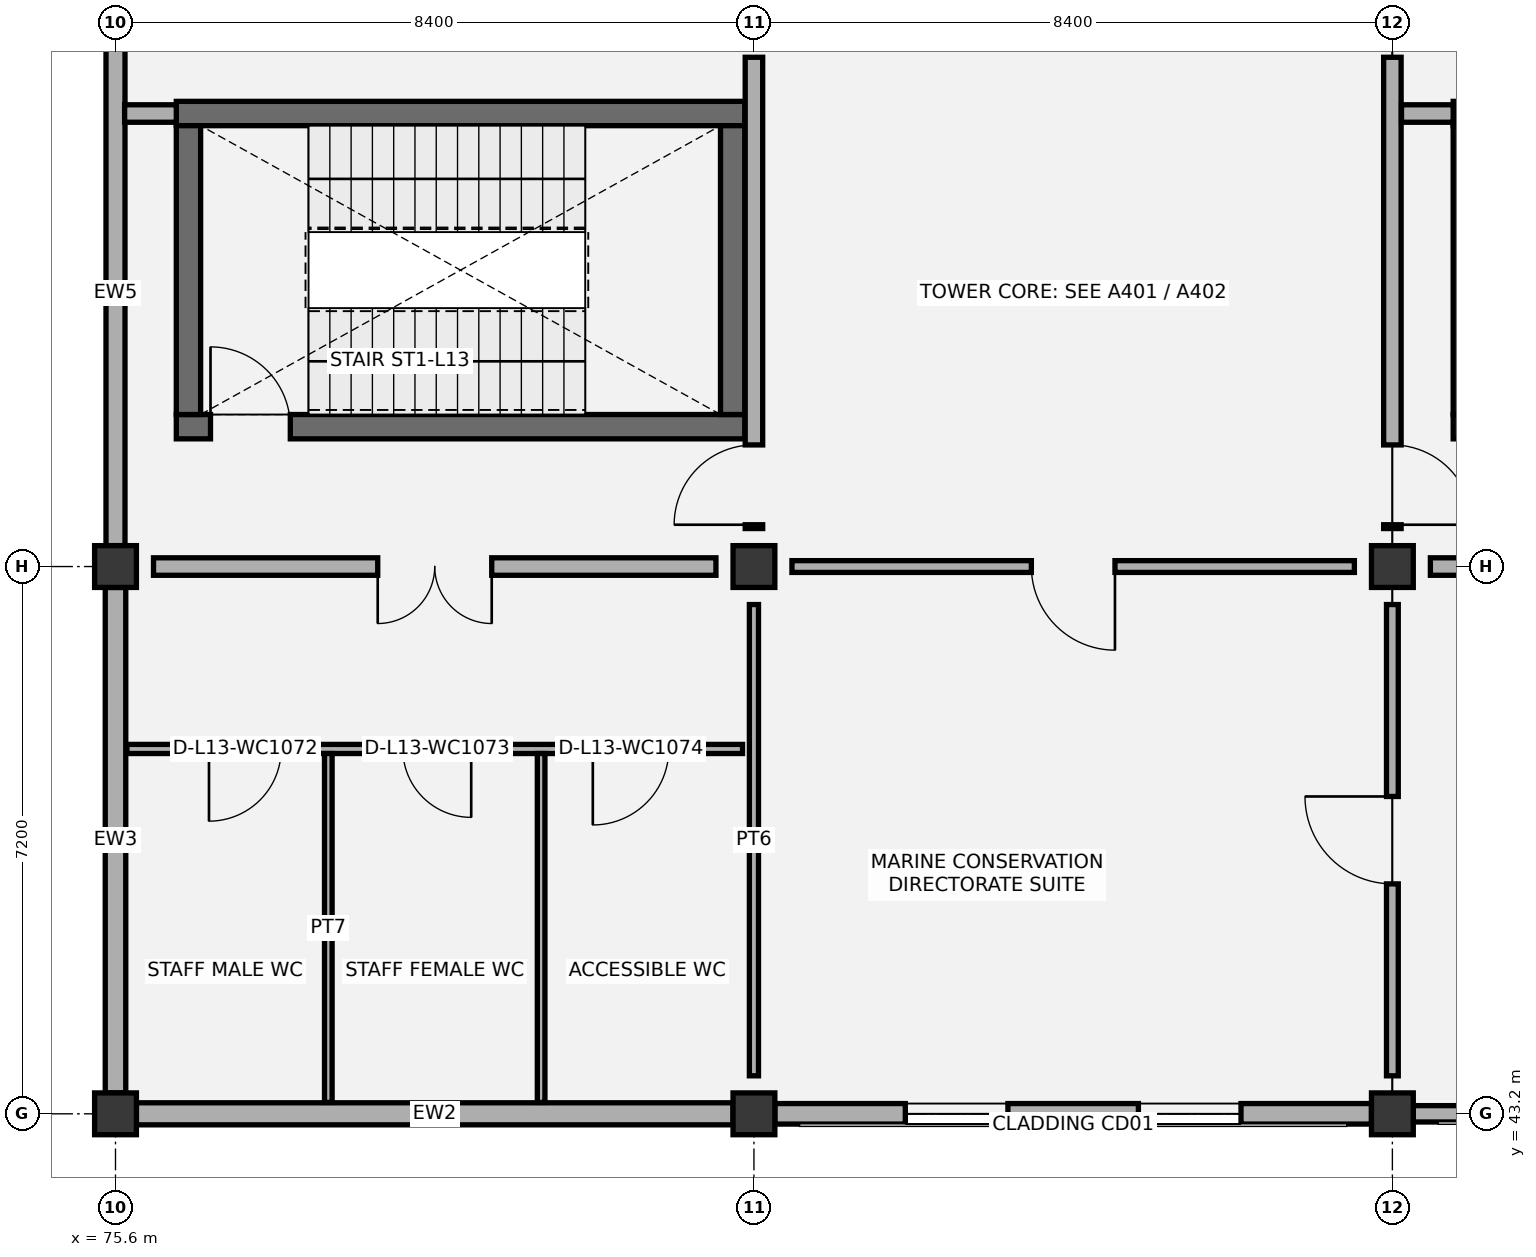
"""IFC4 building model, lengths in metres.
Left out: names, types, materials, properties, quantities, classifications, styles, units other than length and angle.
Written with IfcOpenShell. Run it as: python <this file> out.ifc"""

import sys

from ifc_helpers import new_model, si_unit, direction, frame, frame_2d, origin, origin_2d, place, context, subcontext, project, spatial, rectangle, extrude, element, fill, save


model = new_model("IFC4")
c1 = context("Model", 3, precision=1e-05, world=origin(), true_north=direction((0.0, 1.0)))
c2 = subcontext(c1, "Body", "Model", "MODEL_VIEW")
j1 = project(units=[si_unit("LENGTHUNIT", "METRE"), si_unit("PLANEANGLEUNIT", "RADIAN")], contexts=[c1])
p1 = place(None, origin())
s1 = spatial("IfcSite", under=j1, at=p1, CompositionType="ELEMENT")
p2 = place(p1, origin())
s2 = spatial("IfcBuilding", under=s1, at=p2, CompositionType="ELEMENT")
p3 = place(p2, frame((0.0, 0.0, 60.6)))
s3 = spatial("IfcBuildingStorey", under=s2, at=p3, CompositionType="ELEMENT", Elevation=60.6)
for number, where, z_axis, x_axis in (
    (1, (75.6, 43.2, 0.0), (0.0, 0.0, 1.0), (1.0, 0.0, 0.0)),
    (2, (75.6, 50.4, 0.0), (0.0, 0.0, 1.0), (1.0, 0.0, 0.0)),
    (3, (84.0, 43.2, 0.0), (0.0, 0.0, 1.0), (1.0, 0.0, 0.0)),
    (4, (84.0, 50.4, 0.0), (0.0, 0.0, 1.0), (1.0, 0.0, 0.0)),
    (5, (92.4, 43.2, 0.0), (0.0, 0.0, 1.0), (1.0, 0.0, 0.0)),
    (6, (92.4, 50.4, 0.0), (0.0, 0.0, 1.0), (1.0, 0.0, 0.0)),
):
    element("IfcColumn", number, at=place(p3, frame(where, z_axis=z_axis, x_axis=x_axis)), inside=s3, PredefinedType="COLUMN", context=c2, shape_type="SweptSolid", body=[
        extrude(rectangle(XDim=0.55, YDim=0.55, at=origin_2d()), origin(), (0.0, 0.0, 1.0), 4.2),
    ])
p4 = place(p3, frame((76.4, 52.24, 0.0), z_axis=(0.0, 0.0, 1.0), x_axis=(1.0, 0.0, 0.0)))
e7 = element("IfcWall", 7, at=p4, inside=s3, PredefinedType="SHEAR", context=c2, shape_type="SweptSolid", body=[
    extrude(rectangle(XDim=7.48, YDim=0.32, at=frame_2d((3.74, 0.0))), origin(), (0.0, 0.0, 1.0), 3.95),
])
p5 = place(p4, frame((0.45, 0.0, 0.0)))
e8 = element("IfcOpeningElement", 8, at=p5, cuts=e7, PredefinedType="OPENING", context=c2, shape_type="SweptSolid", body=[
    extrude(rectangle(XDim=1.05, YDim=2.15, at=frame_2d((0.525, 1.075))), frame((0.0, 0.17, 0.0), z_axis=(0.0, -1.0, 0.0), x_axis=(1.0, 0.0, 0.0)), (0.0, 0.0, 1.0), 0.34),
])
p6 = place(p3, frame((76.4, 56.36, 0.0), z_axis=(0.0, 0.0, 1.0), x_axis=(1.0, 0.0, 0.0)))
e9 = element("IfcWall", 9, at=p6, inside=s3, PredefinedType="SHEAR", context=c2, shape_type="SweptSolid", body=[
    extrude(rectangle(XDim=7.48, YDim=0.32, at=frame_2d((3.74, 0.0))), origin(), (0.0, 0.0, 1.0), 3.95),
])
for number, where, z_axis, x_axis in (
    (10, (76.56, 52.4, 0.0), (0.0, 0.0, 1.0), (0.0, 1.0, 0.0)),
    (11, (83.72, 52.4, 0.0), (0.0, 0.0, 1.0), (0.0, 1.0, 0.0)),
):
    element("IfcWall", number, at=place(p3, frame(where, z_axis=z_axis, x_axis=x_axis)), inside=s3, PredefinedType="SHEAR", context=c2, shape_type="SweptSolid", body=[
        extrude(rectangle(XDim=3.8, YDim=0.32, at=frame_2d((1.9, 0.0))), origin(), (0.0, 0.0, 1.0), 3.95),
    ])
p7 = place(p3, frame((93.2, 52.24, 0.0), z_axis=(0.0, 0.0, 1.0), x_axis=(1.0, 0.0, 0.0)))
e12 = element("IfcWall", 12, at=p7, inside=s3, PredefinedType="SHEAR", context=c2, shape_type="SweptSolid", body=[
    extrude(rectangle(XDim=7.48, YDim=0.32, at=frame_2d((3.74, 0.0))), origin(), (0.0, 0.0, 1.0), 3.95),
])
p8 = place(p7, frame((0.45, 0.0, 0.0)))
e13 = element("IfcOpeningElement", 13, at=p8, cuts=e12, PredefinedType="OPENING", context=c2, shape_type="SweptSolid", body=[
    extrude(rectangle(XDim=1.05, YDim=2.15, at=frame_2d((0.525, 1.075))), frame((0.0, 0.17, 0.0), z_axis=(0.0, -1.0, 0.0), x_axis=(1.0, 0.0, 0.0)), (0.0, 0.0, 1.0), 0.34),
])
p9 = place(p3, frame((93.2, 56.36, 0.0), z_axis=(0.0, 0.0, 1.0), x_axis=(1.0, 0.0, 0.0)))
e14 = element("IfcWall", 14, at=p9, inside=s3, PredefinedType="SHEAR", context=c2, shape_type="SweptSolid", body=[
    extrude(rectangle(XDim=7.48, YDim=0.32, at=frame_2d((3.74, 0.0))), origin(), (0.0, 0.0, 1.0), 3.95),
])
p10 = place(p3, frame((93.36, 52.4, 0.0), z_axis=(0.0, 0.0, 1.0), x_axis=(0.0, 1.0, 0.0)))
e15 = element("IfcWall", 15, at=p10, inside=s3, PredefinedType="SHEAR", context=c2, shape_type="SweptSolid", body=[
    extrude(rectangle(XDim=3.8, YDim=0.32, at=frame_2d((1.9, 0.0))), origin(), (0.0, 0.0, 1.0), 3.95),
])
p11 = place(p3, frame((75.875, 43.2, 0.0), z_axis=(0.0, 0.0, 1.0), x_axis=(1.0, 0.0, 0.0)))
e16 = element("IfcWall", 16, at=p11, inside=s3, PredefinedType="SOLIDWALL", context=c2, shape_type="SweptSolid", body=[
    extrude(rectangle(XDim=7.85, YDim=0.29, at=frame_2d((3.925, 0.0))), origin(), (0.0, 0.0, 1.0), 3.395),
])
p12 = place(p3, frame((75.6, 43.475, 0.0), z_axis=(0.0, 0.0, 1.0), x_axis=(0.0, 1.0, 0.0)))
e17 = element("IfcWall", 17, at=p12, inside=s3, PredefinedType="SOLIDWALL", context=c2, shape_type="SweptSolid", body=[
    extrude(rectangle(XDim=6.65, YDim=0.27, at=frame_2d((3.325, 0.0))), origin(), (0.0, 0.0, 1.0), 3.395),
])
p13 = place(p3, frame((75.6, 50.675, 0.0), z_axis=(0.0, 0.0, 1.0), x_axis=(0.0, 1.0, 0.0)))
e18 = element("IfcWall", 18, at=p13, inside=s3, PredefinedType="SOLIDWALL", context=c2, shape_type="SweptSolid", body=[
    extrude(rectangle(XDim=6.65, YDim=0.25, at=frame_2d((3.325, 0.0))), origin(), (0.0, 0.0, 1.0), 3.395),
])
p14 = place(p3, frame((84.275, 43.2, 0.0), z_axis=(0.0, 0.0, 1.0), x_axis=(1.0, 0.0, 0.0)))
e19 = element("IfcWall", 19, at=p14, inside=s3, PredefinedType="SOLIDWALL", context=c2, shape_type="SweptSolid", body=[
    extrude(rectangle(XDim=7.85, YDim=0.27, at=frame_2d((3.925, 0.0))), origin(), (0.0, 0.0, 1.0), 3.395),
])
p15 = place(p14, frame((1.717, 0.0, 0.95)))
e20 = element("IfcOpeningElement", 20, at=p15, cuts=e19, PredefinedType="OPENING", context=c2, shape_type="SweptSolid", body=[
    extrude(rectangle(XDim=1.35, YDim=1.65, at=frame_2d((0.675, 0.825))), frame((0.0, 0.145, 0.0), z_axis=(0.0, -1.0, 0.0), x_axis=(1.0, 0.0, 0.0)), (0.0, 0.0, 1.0), 0.29),
])
p16 = place(p14, frame((4.783, 0.0, 0.95)))
e21 = element("IfcOpeningElement", 21, at=p16, cuts=e19, PredefinedType="OPENING", context=c2, shape_type="SweptSolid", body=[
    extrude(rectangle(XDim=1.35, YDim=1.65, at=frame_2d((0.675, 0.825))), frame((0.0, 0.145, 0.0), z_axis=(0.0, -1.0, 0.0), x_axis=(1.0, 0.0, 0.0)), (0.0, 0.0, 1.0), 0.29),
])
p17 = place(p3, frame((92.675, 43.2, 0.0), z_axis=(0.0, 0.0, 1.0), x_axis=(1.0, 0.0, 0.0)))
e22 = element("IfcWall", 22, at=p17, inside=s3, PredefinedType="SOLIDWALL", context=c2, shape_type="SweptSolid", body=[
    extrude(rectangle(XDim=7.85, YDim=0.215, at=frame_2d((3.925, 0.0))), origin(), (0.0, 0.0, 1.0), 3.395),
])
p18 = place(p17, frame((1.417, 0.0, 0.95)))
e23 = element("IfcOpeningElement", 23, at=p18, cuts=e22, PredefinedType="OPENING", context=c2, shape_type="SweptSolid", body=[
    extrude(rectangle(XDim=1.8, YDim=1.5, at=frame_2d((0.9, 0.75))), frame((0.0, 0.117, 0.0), z_axis=(0.0, -1.0, 0.0), x_axis=(1.0, 0.0, 0.0)), (0.0, 0.0, 1.0), 0.235),
])
p19 = place(p17, frame((4.633, 0.0, 0.95)))
e24 = element("IfcOpeningElement", 24, at=p19, cuts=e22, PredefinedType="OPENING", context=c2, shape_type="SweptSolid", body=[
    extrude(rectangle(XDim=1.8, YDim=1.5, at=frame_2d((0.9, 0.75))), frame((0.0, 0.117, 0.0), z_axis=(0.0, -1.0, 0.0), x_axis=(1.0, 0.0, 0.0)), (0.0, 0.0, 1.0), 0.235),
])
p20 = place(p3, frame((75.75, 48.0, 0.0), z_axis=(0.0, 0.0, 1.0), x_axis=(1.0, 0.0, 0.0)))
e25 = element("IfcWall", 25, at=p20, inside=s3, PredefinedType="PARTITIONING", context=c2, shape_type="SweptSolid", body=[
    extrude(rectangle(XDim=8.1, YDim=0.12, at=frame_2d((4.05, 0.0))), origin(), (0.0, 0.0, 1.0), 3.95),
])
p21 = place(p20, frame((1.08, 0.0, 0.0)))
e26 = element("IfcOpeningElement", 26, at=p21, cuts=e25, PredefinedType="OPENING", context=c2, shape_type="SweptSolid", body=[
    extrude(rectangle(XDim=0.95, YDim=2.1, at=frame_2d((0.475, 1.05))), frame((0.0, 0.07, 0.0), z_axis=(0.0, -1.0, 0.0), x_axis=(1.0, 0.0, 0.0)), (0.0, 0.0, 1.0), 0.14),
])
p22 = place(p20, frame((3.63, 0.0, 0.0)))
e27 = element("IfcOpeningElement", 27, at=p22, cuts=e25, PredefinedType="OPENING", context=c2, shape_type="SweptSolid", body=[
    extrude(rectangle(XDim=0.9, YDim=2.1, at=frame_2d((0.45, 1.05))), frame((0.0, 0.07, 0.0), z_axis=(0.0, -1.0, 0.0), x_axis=(1.0, 0.0, 0.0)), (0.0, 0.0, 1.0), 0.14),
])
p23 = place(p20, frame((6.13, 0.0, 0.0)))
e28 = element("IfcOpeningElement", 28, at=p23, cuts=e25, PredefinedType="OPENING", context=c2, shape_type="SweptSolid", body=[
    extrude(rectangle(XDim=1.0, YDim=2.1, at=frame_2d((0.5, 1.05))), frame((0.0, 0.07, 0.0), z_axis=(0.0, -1.0, 0.0), x_axis=(1.0, 0.0, 0.0)), (0.0, 0.0, 1.0), 0.14),
])
for number, where, z_axis, x_axis in (
    (29, (78.4, 43.35, 0.0), (0.0, 0.0, 1.0), (0.0, 1.0, 0.0)),
    (30, (81.2, 43.35, 0.0), (0.0, 0.0, 1.0), (0.0, 1.0, 0.0)),
):
    element("IfcWall", number, at=place(p3, frame(where, z_axis=z_axis, x_axis=x_axis)), inside=s3, PredefinedType="PARTITIONING", context=c2, shape_type="SweptSolid", body=[
        extrude(rectangle(XDim=4.59, YDim=0.1, at=frame_2d((2.295, 0.0))), origin(), (0.0, 0.0, 1.0), 3.95),
    ])
p24 = place(p3, frame((84.0, 43.7, 0.0), z_axis=(0.0, 0.0, 1.0), x_axis=(0.0, 1.0, 0.0)))
e31 = element("IfcWall", 31, at=p24, inside=s3, PredefinedType="PARTITIONING", context=c2, shape_type="SweptSolid", body=[
    extrude(rectangle(XDim=6.2, YDim=0.12, at=frame_2d((3.1, 0.0))), origin(), (0.0, 0.0, 1.0), 3.445),
])
p25 = place(p3, frame((76.1, 50.4, 0.0), z_axis=(0.0, 0.0, 1.0), x_axis=(1.0, 0.0, 0.0)))
e32 = element("IfcWall", 32, at=p25, inside=s3, PredefinedType="PARTITIONING", context=c2, shape_type="SweptSolid", body=[
    extrude(rectangle(XDim=7.4, YDim=0.23, at=frame_2d((3.7, 0.0))), origin(), (0.0, 0.0, 1.0), 3.545),
])
p26 = place(p25, frame((2.95, 0.0, 0.0)))
e33 = element("IfcOpeningElement", 33, at=p26, cuts=e32, PredefinedType="OPENING", context=c2, shape_type="SweptSolid", body=[
    extrude(rectangle(XDim=1.5, YDim=2.15, at=frame_2d((0.75, 1.075))), frame((0.0, 0.125, 0.0), z_axis=(0.0, -1.0, 0.0), x_axis=(1.0, 0.0, 0.0)), (0.0, 0.0, 1.0), 0.25),
])
p27 = place(p3, frame((84.0, 50.9, 0.0), z_axis=(0.0, 0.0, 1.0), x_axis=(0.0, 1.0, 0.0)))
e34 = element("IfcWall", 34, at=p27, inside=s3, PredefinedType="PARTITIONING", context=c2, shape_type="SweptSolid", body=[
    extrude(rectangle(XDim=6.2, YDim=0.23, at=frame_2d((3.1, 0.0))), origin(), (0.0, 0.0, 1.0), 3.545),
])
p28 = place(p27, frame((0.05, 0.0, 0.0)))
e35 = element("IfcOpeningElement", 35, at=p28, cuts=e34, PredefinedType="OPENING", context=c2, shape_type="SweptSolid", body=[
    extrude(rectangle(XDim=1.05, YDim=2.15, at=frame_2d((0.525, 1.075))), frame((0.0, 0.125, 0.0), z_axis=(0.0, -1.0, 0.0), x_axis=(1.0, 0.0, 0.0)), (0.0, 0.0, 1.0), 0.25),
])
p29 = place(p3, frame((75.72, 56.36, 0.0), z_axis=(0.0, 0.0, 1.0), x_axis=(1.0, 0.0, 0.0)))
e36 = element("IfcWall", 36, at=p29, inside=s3, PredefinedType="PARTITIONING", context=c2, shape_type="SweptSolid", body=[
    extrude(rectangle(XDim=0.68, YDim=0.23, at=frame_2d((0.34, 0.0))), origin(), (0.0, 0.0, 1.0), 3.95),
])
p30 = place(p3, frame((92.4, 43.7, 0.0), z_axis=(0.0, 0.0, 1.0), x_axis=(0.0, 1.0, 0.0)))
e37 = element("IfcWall", 37, at=p30, inside=s3, PredefinedType="PARTITIONING", context=c2, shape_type="SweptSolid", body=[
    extrude(rectangle(XDim=6.2, YDim=0.155, at=frame_2d((3.1, 0.0))), origin(), (0.0, 0.0, 1.0), 3.545),
])
p31 = place(p30, frame((2.525, 0.0, 0.0)))
e38 = element("IfcOpeningElement", 38, at=p31, cuts=e37, PredefinedType="OPENING", context=c2, shape_type="SweptSolid", body=[
    extrude(rectangle(XDim=1.15, YDim=2.1, at=frame_2d((0.575, 1.05))), frame((0.0, 0.087, 0.0), z_axis=(0.0, -1.0, 0.0), x_axis=(1.0, 0.0, 0.0)), (0.0, 0.0, 1.0), 0.175),
])
p32 = place(p3, frame((84.5, 50.4, 0.0), z_axis=(0.0, 0.0, 1.0), x_axis=(1.0, 0.0, 0.0)))
e39 = element("IfcWall", 39, at=p32, inside=s3, PredefinedType="PARTITIONING", context=c2, shape_type="SweptSolid", body=[
    extrude(rectangle(XDim=7.4, YDim=0.155, at=frame_2d((3.7, 0.0))), origin(), (0.0, 0.0, 1.0), 3.595),
])
p33 = place(p32, frame((3.15, 0.0, 0.0)))
e40 = element("IfcOpeningElement", 40, at=p33, cuts=e39, PredefinedType="OPENING", context=c2, shape_type="SweptSolid", body=[
    extrude(rectangle(XDim=1.1, YDim=2.1, at=frame_2d((0.55, 1.05))), frame((0.0, 0.087, 0.0), z_axis=(0.0, -1.0, 0.0), x_axis=(1.0, 0.0, 0.0)), (0.0, 0.0, 1.0), 0.175),
])
p34 = place(p3, frame((92.4, 50.9, 0.0), z_axis=(0.0, 0.0, 1.0), x_axis=(0.0, 1.0, 0.0)))
e41 = element("IfcWall", 41, at=p34, inside=s3, PredefinedType="PARTITIONING", context=c2, shape_type="SweptSolid", body=[
    extrude(rectangle(XDim=6.2, YDim=0.23, at=frame_2d((3.1, 0.0))), origin(), (0.0, 0.0, 1.0), 3.445),
])
p35 = place(p34, frame((0.05, 0.0, 0.0)))
e42 = element("IfcOpeningElement", 42, at=p35, cuts=e41, PredefinedType="OPENING", context=c2, shape_type="SweptSolid", body=[
    extrude(rectangle(XDim=1.05, YDim=2.15, at=frame_2d((0.525, 1.075))), frame((0.0, 0.125, 0.0), z_axis=(0.0, -1.0, 0.0), x_axis=(1.0, 0.0, 0.0)), (0.0, 0.0, 1.0), 0.25),
])
p36 = place(p3, frame((92.9, 50.4, 0.0), z_axis=(0.0, 0.0, 1.0), x_axis=(1.0, 0.0, 0.0)))
e43 = element("IfcWall", 43, at=p36, inside=s3, PredefinedType="PARTITIONING", context=c2, shape_type="SweptSolid", body=[
    extrude(rectangle(XDim=7.4, YDim=0.23, at=frame_2d((3.7, 0.0))), origin(), (0.0, 0.0, 1.0), 3.655),
])
p37 = place(p36, frame((2.95, 0.0, 0.0)))
e44 = element("IfcOpeningElement", 44, at=p37, cuts=e43, PredefinedType="OPENING", context=c2, shape_type="SweptSolid", body=[
    extrude(rectangle(XDim=1.5, YDim=2.15, at=frame_2d((0.75, 1.075))), frame((0.0, 0.125, 0.0), z_axis=(0.0, -1.0, 0.0), x_axis=(1.0, 0.0, 0.0)), (0.0, 0.0, 1.0), 0.25),
])
p38 = place(p3, frame((92.52, 56.36, 0.0), z_axis=(0.0, 0.0, 1.0), x_axis=(1.0, 0.0, 0.0)))
e45 = element("IfcWall", 45, at=p38, inside=s3, PredefinedType="PARTITIONING", context=c2, shape_type="SweptSolid", body=[
    extrude(rectangle(XDim=0.68, YDim=0.23, at=frame_2d((0.34, 0.0))), origin(), (0.0, 0.0, 1.0), 3.95),
])
p39 = place(p15, origin())
e46 = element("IfcWindow", 46, at=p39, inside=s3, PartitioningType="SINGLE_PANEL", PredefinedType="WINDOW", context=c2, shape_type="SweptSolid", body=[
    extrude(rectangle(XDim=1.35, YDim=1.65, at=frame_2d((0.675, 0.825))), frame((0.0, 0.03, 0.0), z_axis=(0.0, -1.0, 0.0), x_axis=(1.0, 0.0, 0.0)), (0.0, 0.0, 1.0), 0.06),
])
fill(e20, e46)
p40 = place(p16, origin())
e47 = element("IfcWindow", 47, at=p40, inside=s3, PartitioningType="SINGLE_PANEL", PredefinedType="WINDOW", context=c2, shape_type="SweptSolid", body=[
    extrude(rectangle(XDim=1.35, YDim=1.65, at=frame_2d((0.675, 0.825))), frame((0.0, 0.03, 0.0), z_axis=(0.0, -1.0, 0.0), x_axis=(1.0, 0.0, 0.0)), (0.0, 0.0, 1.0), 0.06),
])
fill(e21, e47)
p41 = place(p5, origin())
e48 = element("IfcDoor", 48, at=p41, inside=s3, OperationType="SINGLE_SWING_LEFT", PredefinedType="DOOR", context=c2, shape_type="SweptSolid", body=[
    extrude(rectangle(XDim=1.05, YDim=2.15, at=frame_2d((0.525, 1.075))), frame((0.0, 0.025, 0.0), z_axis=(0.0, -1.0, 0.0), x_axis=(1.0, 0.0, 0.0)), (0.0, 0.0, 1.0), 0.05),
])
fill(e8, e48)
p42 = place(p21, frame((0.95, 0.0, 0.0), z_axis=(0.0, 0.0, 1.0), x_axis=(-1.0, 0.0, 0.0)))
e49 = element("IfcDoor", 49, at=p42, inside=s3, OperationType="SINGLE_SWING_RIGHT", PredefinedType="DOOR", context=c2, shape_type="SweptSolid", body=[
    extrude(rectangle(XDim=0.95, YDim=2.1, at=frame_2d((0.475, 1.05))), frame((0.0, 0.025, 0.0), z_axis=(0.0, -1.0, 0.0), x_axis=(1.0, 0.0, 0.0)), (0.0, 0.0, 1.0), 0.05),
])
fill(e26, e49)
p43 = place(p22, frame((0.9, 0.0, 0.0), z_axis=(0.0, 0.0, 1.0), x_axis=(-1.0, 0.0, 0.0)))
e50 = element("IfcDoor", 50, at=p43, inside=s3, OperationType="SINGLE_SWING_LEFT", PredefinedType="DOOR", context=c2, shape_type="SweptSolid", body=[
    extrude(rectangle(XDim=0.9, YDim=2.1, at=frame_2d((0.45, 1.05))), frame((0.0, 0.025, 0.0), z_axis=(0.0, -1.0, 0.0), x_axis=(1.0, 0.0, 0.0)), (0.0, 0.0, 1.0), 0.05),
])
fill(e27, e50)
p44 = place(p23, frame((1.0, 0.0, 0.0), z_axis=(0.0, 0.0, 1.0), x_axis=(-1.0, 0.0, 0.0)))
e51 = element("IfcDoor", 51, at=p44, inside=s3, OperationType="SINGLE_SWING_RIGHT", PredefinedType="DOOR", context=c2, shape_type="SweptSolid", body=[
    extrude(rectangle(XDim=1.0, YDim=2.1, at=frame_2d((0.5, 1.05))), frame((0.0, 0.025, 0.0), z_axis=(0.0, -1.0, 0.0), x_axis=(1.0, 0.0, 0.0)), (0.0, 0.0, 1.0), 0.05),
])
fill(e28, e51)
p45 = place(p26, frame((1.5, 0.0, 0.0), z_axis=(0.0, 0.0, 1.0), x_axis=(-1.0, 0.0, 0.0)))
e52 = element("IfcDoor", 52, at=p45, inside=s3, OperationType="DOUBLE_DOOR_SINGLE_SWING", PredefinedType="DOOR", context=c2, shape_type="SweptSolid", body=[
    extrude(rectangle(XDim=1.5, YDim=2.15, at=frame_2d((0.75, 1.075))), frame((0.0, 0.025, 0.0), z_axis=(0.0, -1.0, 0.0), x_axis=(1.0, 0.0, 0.0)), (0.0, 0.0, 1.0), 0.05),
])
fill(e33, e52)
p46 = place(p28, origin())
e53 = element("IfcDoor", 53, at=p46, inside=s3, OperationType="SINGLE_SWING_LEFT", PredefinedType="DOOR", context=c2, shape_type="SweptSolid", body=[
    extrude(rectangle(XDim=1.05, YDim=2.15, at=frame_2d((0.525, 1.075))), frame((0.0, 0.025, 0.0), z_axis=(0.0, -1.0, 0.0), x_axis=(1.0, 0.0, 0.0)), (0.0, 0.0, 1.0), 0.05),
])
fill(e35, e53)
p47 = place(p31, origin())
e54 = element("IfcDoor", 54, at=p47, inside=s3, OperationType="SINGLE_SWING_RIGHT", PredefinedType="DOOR", context=c2, shape_type="SweptSolid", body=[
    extrude(rectangle(XDim=1.15, YDim=2.1, at=frame_2d((0.575, 1.05))), frame((0.0, 0.025, 0.0), z_axis=(0.0, -1.0, 0.0), x_axis=(1.0, 0.0, 0.0)), (0.0, 0.0, 1.0), 0.05),
])
fill(e38, e54)
p48 = place(p33, frame((1.1, 0.0, 0.0), z_axis=(0.0, 0.0, 1.0), x_axis=(-1.0, 0.0, 0.0)))
e55 = element("IfcDoor", 55, at=p48, inside=s3, OperationType="SINGLE_SWING_LEFT", PredefinedType="DOOR", context=c2, shape_type="SweptSolid", body=[
    extrude(rectangle(XDim=1.1, YDim=2.1, at=frame_2d((0.55, 1.05))), frame((0.0, 0.025, 0.0), z_axis=(0.0, -1.0, 0.0), x_axis=(1.0, 0.0, 0.0)), (0.0, 0.0, 1.0), 0.05),
])
fill(e40, e55)
p49 = place(p35, frame((1.05, 0.0, 0.0), z_axis=(0.0, 0.0, 1.0), x_axis=(-1.0, 0.0, 0.0)))
e56 = element("IfcDoor", 56, at=p49, inside=s3, OperationType="SINGLE_SWING_RIGHT", PredefinedType="DOOR", context=c2, shape_type="SweptSolid", body=[
    extrude(rectangle(XDim=1.05, YDim=2.15, at=frame_2d((0.525, 1.075))), frame((0.0, 0.025, 0.0), z_axis=(0.0, -1.0, 0.0), x_axis=(1.0, 0.0, 0.0)), (0.0, 0.0, 1.0), 0.05),
])
fill(e42, e56)
save(model, sys.argv[1])
